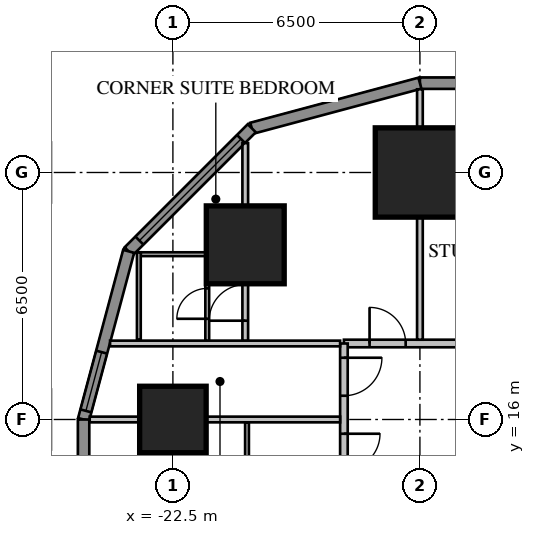
"""IFC4 building model, lengths in metres.
Left out: names, types, materials, properties, quantities, classifications, styles, units other than length and angle.
Written with IfcOpenShell. Run it as: python <this file> out.ifc"""

import sys

from ifc_helpers import new_model, si_unit, direction, frame, frame_2d, origin, origin_2d, place, context, subcontext, project, spatial, rectangle, extrude, element, fill, save


model = new_model("IFC4")
c1 = context("Model", 3, precision=1e-05, world=origin(), true_north=direction((0.0, 1.0)))
c2 = subcontext(c1, "Body", "Model", "MODEL_VIEW")
j1 = project(units=[si_unit("LENGTHUNIT", "METRE"), si_unit("PLANEANGLEUNIT", "RADIAN")], contexts=[c1])
p1 = place(None, origin())
s1 = spatial("IfcSite", under=j1, at=p1, CompositionType="ELEMENT")
p2 = place(p1, origin())
s2 = spatial("IfcBuilding", under=s1, at=p2, CompositionType="ELEMENT")
p3 = place(p2, frame((0.0, 0.0, 46.8)))
s3 = spatial("IfcBuildingStorey", under=s2, at=p3, CompositionType="ELEMENT", Elevation=46.8)
p4 = place(p3, frame((-16.0, 22.5, 0.0), z_axis=(0.0, 0.0, 1.0), x_axis=(1.0, 0.0, 0.0)))
e1 = element("IfcColumn", 1, at=p4, inside=s3, PredefinedType="COLUMN", context=c2, shape_type="SweptSolid", body=[
    extrude(rectangle(XDim=2.35, YDim=2.35, at=origin_2d()), origin(), (0.0, 0.0, 1.0), 3.85),
])
p5 = place(p3, frame((-20.596, 20.596, 0.0), z_axis=(0.0, 0.0, 1.0), x_axis=(1.0, 0.0, 0.0)))
e2 = element("IfcColumn", 2, at=p5, inside=s3, PredefinedType="COLUMN", context=c2, shape_type="SweptSolid", body=[
    extrude(rectangle(XDim=2.05, YDim=2.05, at=origin_2d()), origin(), (0.0, 0.0, 1.0), 3.85),
])
p6 = place(p3, frame((-22.5, 16.0, 0.0), z_axis=(0.0, 0.0, 1.0), x_axis=(1.0, 0.0, 0.0)))
e3 = element("IfcColumn", 3, at=p6, inside=s3, PredefinedType="COLUMN", context=c2, shape_type="SweptSolid", body=[
    extrude(rectangle(XDim=1.75, YDim=1.75, at=origin_2d()), origin(), (0.0, 0.0, 1.0), 3.85),
])
p7 = place(p3, frame((16.0, 24.85, 0.0), z_axis=(0.0, 0.0, 1.0), x_axis=(-1.0, 0.0, 0.0)))
e4 = element("IfcWall", 4, at=p7, inside=s3, PredefinedType="SOLIDWALL", context=c2, shape_type="SweptSolid", body=[
    extrude(rectangle(XDim=32.0, YDim=0.3, at=frame_2d((16.0, 0.0))), origin(), (0.0, 0.0, 1.0), 3.65),
])
p8 = place(p7, frame((1.2, 0.0, 0.75)))
e5 = element("IfcOpeningElement", 5, at=p8, cuts=e4, PredefinedType="OPENING", context=c2, shape_type="SweptSolid", body=[
    extrude(rectangle(XDim=1.6, YDim=1.8, at=frame_2d((0.8, 0.9))), frame((0.0, 0.17, 0.0), z_axis=(0.0, -1.0, 0.0), x_axis=(1.0, 0.0, 0.0)), (0.0, 0.0, 1.0), 0.34),
])
p9 = place(p7, frame((5.2, 0.0, 0.75)))
e6 = element("IfcOpeningElement", 6, at=p9, cuts=e4, PredefinedType="OPENING", context=c2, shape_type="SweptSolid", body=[
    extrude(rectangle(XDim=1.6, YDim=1.8, at=frame_2d((0.8, 0.9))), frame((0.0, 0.17, 0.0), z_axis=(0.0, -1.0, 0.0), x_axis=(1.0, 0.0, 0.0)), (0.0, 0.0, 1.0), 0.34),
])
p10 = place(p7, frame((17.2, 0.0, 0.75)))
e7 = element("IfcOpeningElement", 7, at=p10, cuts=e4, PredefinedType="OPENING", context=c2, shape_type="SweptSolid", body=[
    extrude(rectangle(XDim=1.6, YDim=1.8, at=frame_2d((0.8, 0.9))), frame((0.0, 0.17, 0.0), z_axis=(0.0, -1.0, 0.0), x_axis=(1.0, 0.0, 0.0)), (0.0, 0.0, 1.0), 0.34),
])
p11 = place(p7, frame((21.2, 0.0, 0.75)))
e8 = element("IfcOpeningElement", 8, at=p11, cuts=e4, PredefinedType="OPENING", context=c2, shape_type="SweptSolid", body=[
    extrude(rectangle(XDim=1.6, YDim=1.8, at=frame_2d((0.8, 0.9))), frame((0.0, 0.17, 0.0), z_axis=(0.0, -1.0, 0.0), x_axis=(1.0, 0.0, 0.0)), (0.0, 0.0, 1.0), 0.34),
])
p12 = place(p7, frame((25.2, 0.0, 0.75)))
e9 = element("IfcOpeningElement", 9, at=p12, cuts=e4, PredefinedType="OPENING", context=c2, shape_type="SweptSolid", body=[
    extrude(rectangle(XDim=1.6, YDim=1.8, at=frame_2d((0.8, 0.9))), frame((0.0, 0.17, 0.0), z_axis=(0.0, -1.0, 0.0), x_axis=(1.0, 0.0, 0.0)), (0.0, 0.0, 1.0), 0.34),
])
p13 = place(p7, frame((29.2, 0.0, 0.75)))
e10 = element("IfcOpeningElement", 10, at=p13, cuts=e4, PredefinedType="OPENING", context=c2, shape_type="SweptSolid", body=[
    extrude(rectangle(XDim=1.6, YDim=1.8, at=frame_2d((0.8, 0.9))), frame((0.0, 0.17, 0.0), z_axis=(0.0, -1.0, 0.0), x_axis=(1.0, 0.0, 0.0)), (0.0, 0.0, 1.0), 0.34),
])
p14 = place(p7, frame((8.8, 0.0, 0.75)))
e11 = element("IfcOpeningElement", 11, at=p14, cuts=e4, PredefinedType="OPENING", context=c2, shape_type="SweptSolid", body=[
    extrude(rectangle(XDim=2.4, YDim=1.8, at=frame_2d((1.2, 0.9))), frame((0.0, 0.17, 0.0), z_axis=(0.0, -1.0, 0.0), x_axis=(1.0, 0.0, 0.0)), (0.0, 0.0, 1.0), 0.34),
])
p15 = place(p7, frame((13.812, 0.0, 0.0)))
e12 = element("IfcOpeningElement", 12, at=p15, cuts=e4, PredefinedType="OPENING", context=c2, shape_type="SweptSolid", body=[
    extrude(rectangle(XDim=1.0, YDim=2.4, at=frame_2d((0.5, 1.2))), frame((0.0, 0.17, 0.0), z_axis=(0.0, -1.0, 0.0), x_axis=(1.0, 0.0, 0.0)), (0.0, 0.0, 1.0), 0.34),
])
p16 = place(p3, frame((-16.0, 24.85, 0.0), z_axis=(0.0, 0.0, 1.0), x_axis=(-0.965920218567, -0.258839972501, 0.0)))
e13 = element("IfcWall", 13, at=p16, inside=s3, PredefinedType="SOLIDWALL", context=c2, shape_type="SweptSolid", body=[
    extrude(rectangle(XDim=4.581, YDim=0.3, at=frame_2d((2.291, 0.0))), origin(), (0.0, 0.0, 1.0), 3.65),
])
p17 = place(p3, frame((-20.425, 23.664, 0.0), z_axis=(0.0, 0.0, 1.0), x_axis=(-0.707106781187, -0.707106781187, 0.0)))
e14 = element("IfcWall", 14, at=p17, inside=s3, PredefinedType="SOLIDWALL", context=c2, shape_type="SweptSolid", body=[
    extrude(rectangle(XDim=4.581, YDim=0.3, at=frame_2d((2.291, 0.0))), origin(), (0.0, 0.0, 1.0), 3.65),
])
p18 = place(p17, frame((0.4, 0.0, 0.75)))
e15 = element("IfcOpeningElement", 15, at=p18, cuts=e14, PredefinedType="OPENING", context=c2, shape_type="SweptSolid", body=[
    extrude(rectangle(XDim=3.781, YDim=1.8, at=frame_2d((1.891, 0.9))), frame((0.0, 0.17, 0.0), z_axis=(0.0, -1.0, 0.0), x_axis=(1.0, 0.0, 0.0)), (0.0, 0.0, 1.0), 0.34),
])
p19 = place(p3, frame((-23.664, 20.425, 0.0), z_axis=(0.0, 0.0, 1.0), x_axis=(-0.258839972501, -0.965920218567, 0.0)))
e16 = element("IfcWall", 16, at=p19, inside=s3, PredefinedType="SOLIDWALL", context=c2, shape_type="SweptSolid", body=[
    extrude(rectangle(XDim=4.581, YDim=0.3, at=frame_2d((2.291, 0.0))), origin(), (0.0, 0.0, 1.0), 3.65),
])
p20 = place(p19, frame((2.746, 0.0, 0.75)))
e17 = element("IfcOpeningElement", 17, at=p20, cuts=e16, PredefinedType="OPENING", context=c2, shape_type="SweptSolid", body=[
    extrude(rectangle(XDim=1.6, YDim=1.8, at=frame_2d((0.8, 0.9))), frame((0.0, 0.17, 0.0), z_axis=(0.0, -1.0, 0.0), x_axis=(1.0, 0.0, 0.0)), (0.0, 0.0, 1.0), 0.34),
])
p21 = place(p3, frame((-24.85, 16.0, 0.0), z_axis=(0.0, 0.0, 1.0), x_axis=(0.0, -1.0, 0.0)))
e18 = element("IfcWall", 18, at=p21, inside=s3, PredefinedType="SOLIDWALL", context=c2, shape_type="SweptSolid", body=[
    extrude(rectangle(XDim=32.0, YDim=0.3, at=frame_2d((16.0, 0.0))), origin(), (0.0, 0.0, 1.0), 3.65),
])
p22 = place(p21, frame((1.2, 0.0, 0.75)))
e19 = element("IfcOpeningElement", 19, at=p22, cuts=e18, PredefinedType="OPENING", context=c2, shape_type="SweptSolid", body=[
    extrude(rectangle(XDim=1.6, YDim=1.8, at=frame_2d((0.8, 0.9))), frame((0.0, 0.17, 0.0), z_axis=(0.0, -1.0, 0.0), x_axis=(1.0, 0.0, 0.0)), (0.0, 0.0, 1.0), 0.34),
])
p23 = place(p21, frame((5.2, 0.0, 0.75)))
e20 = element("IfcOpeningElement", 20, at=p23, cuts=e18, PredefinedType="OPENING", context=c2, shape_type="SweptSolid", body=[
    extrude(rectangle(XDim=1.6, YDim=1.8, at=frame_2d((0.8, 0.9))), frame((0.0, 0.17, 0.0), z_axis=(0.0, -1.0, 0.0), x_axis=(1.0, 0.0, 0.0)), (0.0, 0.0, 1.0), 0.34),
])
p24 = place(p21, frame((17.2, 0.0, 0.75)))
e21 = element("IfcOpeningElement", 21, at=p24, cuts=e18, PredefinedType="OPENING", context=c2, shape_type="SweptSolid", body=[
    extrude(rectangle(XDim=1.6, YDim=1.8, at=frame_2d((0.8, 0.9))), frame((0.0, 0.17, 0.0), z_axis=(0.0, -1.0, 0.0), x_axis=(1.0, 0.0, 0.0)), (0.0, 0.0, 1.0), 0.34),
])
p25 = place(p21, frame((21.2, 0.0, 0.75)))
e22 = element("IfcOpeningElement", 22, at=p25, cuts=e18, PredefinedType="OPENING", context=c2, shape_type="SweptSolid", body=[
    extrude(rectangle(XDim=1.6, YDim=1.8, at=frame_2d((0.8, 0.9))), frame((0.0, 0.17, 0.0), z_axis=(0.0, -1.0, 0.0), x_axis=(1.0, 0.0, 0.0)), (0.0, 0.0, 1.0), 0.34),
])
p26 = place(p21, frame((25.2, 0.0, 0.75)))
e23 = element("IfcOpeningElement", 23, at=p26, cuts=e18, PredefinedType="OPENING", context=c2, shape_type="SweptSolid", body=[
    extrude(rectangle(XDim=1.6, YDim=1.8, at=frame_2d((0.8, 0.9))), frame((0.0, 0.17, 0.0), z_axis=(0.0, -1.0, 0.0), x_axis=(1.0, 0.0, 0.0)), (0.0, 0.0, 1.0), 0.34),
])
p27 = place(p21, frame((29.2, 0.0, 0.75)))
e24 = element("IfcOpeningElement", 24, at=p27, cuts=e18, PredefinedType="OPENING", context=c2, shape_type="SweptSolid", body=[
    extrude(rectangle(XDim=1.6, YDim=1.8, at=frame_2d((0.8, 0.9))), frame((0.0, 0.17, 0.0), z_axis=(0.0, -1.0, 0.0), x_axis=(1.0, 0.0, 0.0)), (0.0, 0.0, 1.0), 0.34),
])
p28 = place(p21, frame((8.8, 0.0, 0.75)))
e25 = element("IfcOpeningElement", 25, at=p28, cuts=e18, PredefinedType="OPENING", context=c2, shape_type="SweptSolid", body=[
    extrude(rectangle(XDim=2.4, YDim=1.8, at=frame_2d((1.2, 0.9))), frame((0.0, 0.17, 0.0), z_axis=(0.0, -1.0, 0.0), x_axis=(1.0, 0.0, 0.0)), (0.0, 0.0, 1.0), 0.34),
])
p29 = place(p21, frame((13.812, 0.0, 0.0)))
e26 = element("IfcOpeningElement", 26, at=p29, cuts=e18, PredefinedType="OPENING", context=c2, shape_type="SweptSolid", body=[
    extrude(rectangle(XDim=1.0, YDim=2.4, at=frame_2d((0.5, 1.2))), frame((0.0, 0.17, 0.0), z_axis=(0.0, -1.0, 0.0), x_axis=(1.0, 0.0, 0.0)), (0.0, 0.0, 1.0), 0.34),
])
p30 = place(p3, frame((18.0, 18.0, 0.0), z_axis=(0.0, 0.0, 1.0), x_axis=(-1.0, 0.0, 0.0)))
e27 = element("IfcWall", 27, at=p30, inside=s3, PredefinedType="PARTITIONING", context=c2, shape_type="SweptSolid", body=[
    extrude(rectangle(XDim=36.0, YDim=0.2, at=frame_2d((18.0, 0.0))), origin(), (0.0, 0.0, 1.0), 3.65),
])
p31 = place(p30, frame((0.375, 0.0, 0.0)))
e28 = element("IfcOpeningElement", 28, at=p31, cuts=e27, PredefinedType="OPENING", context=c2, shape_type="SweptSolid", body=[
    extrude(rectangle(XDim=1.0, YDim=2.1, at=frame_2d((0.5, 1.05))), frame((0.0, 0.12, 0.0), z_axis=(0.0, -1.0, 0.0), x_axis=(1.0, 0.0, 0.0)), (0.0, 0.0, 1.0), 0.24),
])
p32 = place(p30, frame((3.95, 0.0, 0.0)))
e29 = element("IfcOpeningElement", 29, at=p32, cuts=e27, PredefinedType="OPENING", context=c2, shape_type="SweptSolid", body=[
    extrude(rectangle(XDim=0.95, YDim=2.1, at=frame_2d((0.475, 1.05))), frame((0.0, 0.12, 0.0), z_axis=(0.0, -1.0, 0.0), x_axis=(1.0, 0.0, 0.0)), (0.0, 0.0, 1.0), 0.24),
])
p33 = place(p30, frame((7.95, 0.0, 0.0)))
e30 = element("IfcOpeningElement", 30, at=p33, cuts=e27, PredefinedType="OPENING", context=c2, shape_type="SweptSolid", body=[
    extrude(rectangle(XDim=0.95, YDim=2.1, at=frame_2d((0.475, 1.05))), frame((0.0, 0.12, 0.0), z_axis=(0.0, -1.0, 0.0), x_axis=(1.0, 0.0, 0.0)), (0.0, 0.0, 1.0), 0.24),
])
p34 = place(p30, frame((19.95, 0.0, 0.0)))
e31 = element("IfcOpeningElement", 31, at=p34, cuts=e27, PredefinedType="OPENING", context=c2, shape_type="SweptSolid", body=[
    extrude(rectangle(XDim=0.95, YDim=2.1, at=frame_2d((0.475, 1.05))), frame((0.0, 0.12, 0.0), z_axis=(0.0, -1.0, 0.0), x_axis=(1.0, 0.0, 0.0)), (0.0, 0.0, 1.0), 0.24),
])
p35 = place(p30, frame((23.95, 0.0, 0.0)))
e32 = element("IfcOpeningElement", 32, at=p35, cuts=e27, PredefinedType="OPENING", context=c2, shape_type="SweptSolid", body=[
    extrude(rectangle(XDim=0.95, YDim=2.1, at=frame_2d((0.475, 1.05))), frame((0.0, 0.12, 0.0), z_axis=(0.0, -1.0, 0.0), x_axis=(1.0, 0.0, 0.0)), (0.0, 0.0, 1.0), 0.24),
])
p36 = place(p30, frame((27.95, 0.0, 0.0)))
e33 = element("IfcOpeningElement", 33, at=p36, cuts=e27, PredefinedType="OPENING", context=c2, shape_type="SweptSolid", body=[
    extrude(rectangle(XDim=0.95, YDim=2.1, at=frame_2d((0.475, 1.05))), frame((0.0, 0.12, 0.0), z_axis=(0.0, -1.0, 0.0), x_axis=(1.0, 0.0, 0.0)), (0.0, 0.0, 1.0), 0.24),
])
p37 = place(p30, frame((31.95, 0.0, 0.0)))
e34 = element("IfcOpeningElement", 34, at=p37, cuts=e27, PredefinedType="OPENING", context=c2, shape_type="SweptSolid", body=[
    extrude(rectangle(XDim=0.95, YDim=2.1, at=frame_2d((0.475, 1.05))), frame((0.0, 0.12, 0.0), z_axis=(0.0, -1.0, 0.0), x_axis=(1.0, 0.0, 0.0)), (0.0, 0.0, 1.0), 0.24),
])
p38 = place(p30, frame((34.375, 0.0, 0.0)))
e35 = element("IfcOpeningElement", 35, at=p38, cuts=e27, PredefinedType="OPENING", context=c2, shape_type="SweptSolid", body=[
    extrude(rectangle(XDim=0.95, YDim=2.1, at=frame_2d((0.475, 1.05))), frame((0.0, 0.12, 0.0), z_axis=(0.0, -1.0, 0.0), x_axis=(1.0, 0.0, 0.0)), (0.0, 0.0, 1.0), 0.24),
])
p39 = place(p30, frame((11.2, 0.0, 0.0)))
e36 = element("IfcOpeningElement", 36, at=p39, cuts=e27, PredefinedType="OPENING", context=c2, shape_type="SweptSolid", body=[
    extrude(rectangle(XDim=1.0, YDim=2.1, at=frame_2d((0.5, 1.05))), frame((0.0, 0.12, 0.0), z_axis=(0.0, -1.0, 0.0), x_axis=(1.0, 0.0, 0.0)), (0.0, 0.0, 1.0), 0.24),
])
p40 = place(p30, frame((15.2, 0.0, 0.0)))
e37 = element("IfcOpeningElement", 37, at=p40, cuts=e27, PredefinedType="OPENING", context=c2, shape_type="SweptSolid", body=[
    extrude(rectangle(XDim=1.0, YDim=2.1, at=frame_2d((0.5, 1.05))), frame((0.0, 0.12, 0.0), z_axis=(0.0, -1.0, 0.0), x_axis=(1.0, 0.0, 0.0)), (0.0, 0.0, 1.0), 0.24),
])
p41 = place(p3, frame((-16.0, 18.1, 0.0), z_axis=(0.0, 0.0, 1.0), x_axis=(0.0, 1.0, 0.0)))
e38 = element("IfcWall", 38, at=p41, inside=s3, PredefinedType="PARTITIONING", context=c2, shape_type="SweptSolid", body=[
    extrude(rectangle(XDim=6.589, YDim=0.15, at=frame_2d((3.295, 0.0))), origin(), (0.0, 0.0, 1.0), 3.65),
])
p42 = place(p3, frame((-21.596, 18.065, 0.0), z_axis=(0.0, 0.0, 1.0), x_axis=(0.0, 1.0, 0.0)))
e39 = element("IfcWall", 39, at=p42, inside=s3, PredefinedType="PARTITIONING", context=c2, shape_type="SweptSolid", body=[
    extrude(rectangle(XDim=2.335, YDim=0.1, at=frame_2d((1.167, 0.0))), origin(), (0.0, 0.0, 1.0), 3.65),
])
p43 = place(p42, frame((0.585, 0.0, 0.0)))
e40 = element("IfcOpeningElement", 40, at=p43, cuts=e39, PredefinedType="OPENING", context=c2, shape_type="SweptSolid", body=[
    extrude(rectangle(XDim=0.8, YDim=2.1, at=frame_2d((0.4, 1.05))), frame((0.0, 0.07, 0.0), z_axis=(0.0, -1.0, 0.0), x_axis=(1.0, 0.0, 0.0)), (0.0, 0.0, 1.0), 0.14),
])
p44 = place(p3, frame((-21.646, 20.35, 0.0), z_axis=(0.0, 0.0, 1.0), x_axis=(-1.0, 0.0, 0.0)))
e41 = element("IfcWall", 41, at=p44, inside=s3, PredefinedType="PARTITIONING", context=c2, shape_type="SweptSolid", body=[
    extrude(rectangle(XDim=1.7, YDim=0.1, at=frame_2d((0.85, 0.0))), origin(), (0.0, 0.0, 1.0), 3.65),
])
p45 = place(p3, frame((-23.396, 18.1, 0.0), z_axis=(0.0, 0.0, 1.0), x_axis=(0.0, 1.0, 0.0)))
e42 = element("IfcWall", 42, at=p45, inside=s3, PredefinedType="PARTITIONING", context=c2, shape_type="SweptSolid", body=[
    extrude(rectangle(XDim=2.3, YDim=0.1, at=frame_2d((1.15, 0.0))), origin(), (0.0, 0.0, 1.0), 3.65),
])
p46 = place(p3, frame((-20.596, 18.065, 0.0), z_axis=(0.0, 0.0, 1.0), x_axis=(0.0, 1.0, 0.0)))
e43 = element("IfcWall", 43, at=p46, inside=s3, PredefinedType="PARTITIONING", context=c2, shape_type="SweptSolid", body=[
    extrude(rectangle(XDim=5.209, YDim=0.15, at=frame_2d((2.604, 0.0))), origin(), (0.0, 0.0, 1.0), 3.65),
])
p47 = place(p46, frame((0.535, 0.0, 0.0)))
e44 = element("IfcOpeningElement", 44, at=p47, cuts=e43, PredefinedType="OPENING", context=c2, shape_type="SweptSolid", body=[
    extrude(rectangle(XDim=0.95, YDim=2.1, at=frame_2d((0.475, 1.05))), frame((0.0, 0.095, 0.0), z_axis=(0.0, -1.0, 0.0), x_axis=(1.0, 0.0, 0.0)), (0.0, 0.0, 1.0), 0.19),
])
p48 = place(p3, frame((-18.0, 18.0, 0.0), z_axis=(0.0, 0.0, 1.0), x_axis=(0.0, -1.0, 0.0)))
e45 = element("IfcWall", 45, at=p48, inside=s3, PredefinedType="PARTITIONING", context=c2, shape_type="SweptSolid", body=[
    extrude(rectangle(XDim=36.0, YDim=0.2, at=frame_2d((18.0, 0.0))), origin(), (0.0, 0.0, 1.0), 3.65),
])
p49 = place(p48, frame((0.375, 0.0, 0.0)))
e46 = element("IfcOpeningElement", 46, at=p49, cuts=e45, PredefinedType="OPENING", context=c2, shape_type="SweptSolid", body=[
    extrude(rectangle(XDim=1.0, YDim=2.1, at=frame_2d((0.5, 1.05))), frame((0.0, 0.12, 0.0), z_axis=(0.0, -1.0, 0.0), x_axis=(1.0, 0.0, 0.0)), (0.0, 0.0, 1.0), 0.24),
])
p50 = place(p48, frame((2.375, 0.0, 0.0)))
e47 = element("IfcOpeningElement", 47, at=p50, cuts=e45, PredefinedType="OPENING", context=c2, shape_type="SweptSolid", body=[
    extrude(rectangle(XDim=0.95, YDim=2.1, at=frame_2d((0.475, 1.05))), frame((0.0, 0.12, 0.0), z_axis=(0.0, -1.0, 0.0), x_axis=(1.0, 0.0, 0.0)), (0.0, 0.0, 1.0), 0.24),
])
p51 = place(p48, frame((7.95, 0.0, 0.0)))
e48 = element("IfcOpeningElement", 48, at=p51, cuts=e45, PredefinedType="OPENING", context=c2, shape_type="SweptSolid", body=[
    extrude(rectangle(XDim=0.95, YDim=2.1, at=frame_2d((0.475, 1.05))), frame((0.0, 0.12, 0.0), z_axis=(0.0, -1.0, 0.0), x_axis=(1.0, 0.0, 0.0)), (0.0, 0.0, 1.0), 0.24),
])
p52 = place(p48, frame((18.375, 0.0, 0.0)))
e49 = element("IfcOpeningElement", 49, at=p52, cuts=e45, PredefinedType="OPENING", context=c2, shape_type="SweptSolid", body=[
    extrude(rectangle(XDim=0.95, YDim=2.1, at=frame_2d((0.475, 1.05))), frame((0.0, 0.12, 0.0), z_axis=(0.0, -1.0, 0.0), x_axis=(1.0, 0.0, 0.0)), (0.0, 0.0, 1.0), 0.24),
])
p53 = place(p48, frame((23.95, 0.0, 0.0)))
e50 = element("IfcOpeningElement", 50, at=p53, cuts=e45, PredefinedType="OPENING", context=c2, shape_type="SweptSolid", body=[
    extrude(rectangle(XDim=0.95, YDim=2.1, at=frame_2d((0.475, 1.05))), frame((0.0, 0.12, 0.0), z_axis=(0.0, -1.0, 0.0), x_axis=(1.0, 0.0, 0.0)), (0.0, 0.0, 1.0), 0.24),
])
p54 = place(p48, frame((26.375, 0.0, 0.0)))
e51 = element("IfcOpeningElement", 51, at=p54, cuts=e45, PredefinedType="OPENING", context=c2, shape_type="SweptSolid", body=[
    extrude(rectangle(XDim=0.95, YDim=2.1, at=frame_2d((0.475, 1.05))), frame((0.0, 0.12, 0.0), z_axis=(0.0, -1.0, 0.0), x_axis=(1.0, 0.0, 0.0)), (0.0, 0.0, 1.0), 0.24),
])
p55 = place(p48, frame((31.95, 0.0, 0.0)))
e52 = element("IfcOpeningElement", 52, at=p55, cuts=e45, PredefinedType="OPENING", context=c2, shape_type="SweptSolid", body=[
    extrude(rectangle(XDim=0.95, YDim=2.1, at=frame_2d((0.475, 1.05))), frame((0.0, 0.12, 0.0), z_axis=(0.0, -1.0, 0.0), x_axis=(1.0, 0.0, 0.0)), (0.0, 0.0, 1.0), 0.24),
])
p56 = place(p48, frame((34.375, 0.0, 0.0)))
e53 = element("IfcOpeningElement", 53, at=p56, cuts=e45, PredefinedType="OPENING", context=c2, shape_type="SweptSolid", body=[
    extrude(rectangle(XDim=0.95, YDim=2.1, at=frame_2d((0.475, 1.05))), frame((0.0, 0.12, 0.0), z_axis=(0.0, -1.0, 0.0), x_axis=(1.0, 0.0, 0.0)), (0.0, 0.0, 1.0), 0.24),
])
p57 = place(p48, frame((11.2, 0.0, 0.0)))
e54 = element("IfcOpeningElement", 54, at=p57, cuts=e45, PredefinedType="OPENING", context=c2, shape_type="SweptSolid", body=[
    extrude(rectangle(XDim=1.0, YDim=2.1, at=frame_2d((0.5, 1.05))), frame((0.0, 0.12, 0.0), z_axis=(0.0, -1.0, 0.0), x_axis=(1.0, 0.0, 0.0)), (0.0, 0.0, 1.0), 0.24),
])
p58 = place(p3, frame((-18.1, 18.0, 0.0), z_axis=(0.0, 0.0, 1.0), x_axis=(-1.0, 0.0, 0.0)))
e55 = element("IfcWall", 55, at=p58, inside=s3, PredefinedType="PARTITIONING", context=c2, shape_type="SweptSolid", body=[
    extrude(rectangle(XDim=6.053, YDim=0.15, at=frame_2d((3.027, 0.0))), origin(), (0.0, 0.0, 1.0), 3.65),
])
p59 = place(p3, frame((-18.1, 16.0, 0.0), z_axis=(0.0, 0.0, 1.0), x_axis=(-1.0, 0.0, 0.0)))
e56 = element("IfcWall", 56, at=p59, inside=s3, PredefinedType="PARTITIONING", context=c2, shape_type="SweptSolid", body=[
    extrude(rectangle(XDim=6.589, YDim=0.15, at=frame_2d((3.295, 0.0))), origin(), (0.0, 0.0, 1.0), 3.65),
])
p60 = place(p3, frame((-20.55, 15.925, 0.0), z_axis=(0.0, 0.0, 1.0), x_axis=(0.0, -1.0, 0.0)))
e57 = element("IfcWall", 57, at=p60, inside=s3, PredefinedType="PARTITIONING", context=c2, shape_type="SweptSolid", body=[
    extrude(rectangle(XDim=2.15, YDim=0.1, at=frame_2d((1.075, 0.0))), origin(), (0.0, 0.0, 1.0), 3.65),
])
p61 = place(p60, frame((1.05, 0.0, 0.0)))
e58 = element("IfcOpeningElement", 58, at=p61, cuts=e57, PredefinedType="OPENING", context=c2, shape_type="SweptSolid", body=[
    extrude(rectangle(XDim=0.9, YDim=2.1, at=frame_2d((0.45, 1.05))), frame((0.0, 0.07, 0.0), z_axis=(0.0, -1.0, 0.0), x_axis=(1.0, 0.0, 0.0)), (0.0, 0.0, 1.0), 0.14),
])
p62 = place(p18, origin())
e59 = element("IfcWindow", 59, at=p62, inside=s3, PartitioningType="SINGLE_PANEL", PredefinedType="WINDOW", context=c2, shape_type="SweptSolid", body=[
    extrude(rectangle(XDim=3.781, YDim=1.8, at=frame_2d((1.891, 0.9))), frame((0.0, 0.03, 0.0), z_axis=(0.0, -1.0, 0.0), x_axis=(1.0, 0.0, 0.0)), (0.0, 0.0, 1.0), 0.06),
])
fill(e15, e59)
p63 = place(p20, origin())
e60 = element("IfcWindow", 60, at=p63, inside=s3, PartitioningType="SINGLE_PANEL", PredefinedType="WINDOW", context=c2, shape_type="SweptSolid", body=[
    extrude(rectangle(XDim=1.6, YDim=1.8, at=frame_2d((0.8, 0.9))), frame((0.0, 0.03, 0.0), z_axis=(0.0, -1.0, 0.0), x_axis=(1.0, 0.0, 0.0)), (0.0, 0.0, 1.0), 0.06),
])
fill(e17, e60)
p64 = place(p38, origin())
e61 = element("IfcDoor", 61, at=p64, inside=s3, OperationType="SINGLE_SWING_RIGHT", PredefinedType="DOOR", context=c2, shape_type="SweptSolid", body=[
    extrude(rectangle(XDim=0.95, YDim=2.1, at=frame_2d((0.475, 1.05))), frame((0.0, 0.025, 0.0), z_axis=(0.0, -1.0, 0.0), x_axis=(1.0, 0.0, 0.0)), (0.0, 0.0, 1.0), 0.05),
])
fill(e35, e61)
p65 = place(p43, origin())
e62 = element("IfcDoor", 62, at=p65, inside=s3, OperationType="SINGLE_SWING_LEFT", PredefinedType="DOOR", context=c2, shape_type="SweptSolid", body=[
    extrude(rectangle(XDim=0.8, YDim=2.1, at=frame_2d((0.4, 1.05))), frame((0.0, 0.025, 0.0), z_axis=(0.0, -1.0, 0.0), x_axis=(1.0, 0.0, 0.0)), (0.0, 0.0, 1.0), 0.05),
])
fill(e40, e62)
p66 = place(p47, origin())
e63 = element("IfcDoor", 63, at=p66, inside=s3, OperationType="SINGLE_SWING_LEFT", PredefinedType="DOOR", context=c2, shape_type="SweptSolid", body=[
    extrude(rectangle(XDim=0.95, YDim=2.1, at=frame_2d((0.475, 1.05))), frame((0.0, 0.025, 0.0), z_axis=(0.0, -1.0, 0.0), x_axis=(1.0, 0.0, 0.0)), (0.0, 0.0, 1.0), 0.05),
])
fill(e44, e63)
p67 = place(p49, origin())
e64 = element("IfcDoor", 64, at=p67, inside=s3, OperationType="SINGLE_SWING_LEFT", PredefinedType="DOOR", context=c2, shape_type="SweptSolid", body=[
    extrude(rectangle(XDim=1.0, YDim=2.1, at=frame_2d((0.5, 1.05))), frame((0.0, 0.025, 0.0), z_axis=(0.0, -1.0, 0.0), x_axis=(1.0, 0.0, 0.0)), (0.0, 0.0, 1.0), 0.05),
])
fill(e46, e64)
p68 = place(p50, origin())
e65 = element("IfcDoor", 65, at=p68, inside=s3, OperationType="SINGLE_SWING_LEFT", PredefinedType="DOOR", context=c2, shape_type="SweptSolid", body=[
    extrude(rectangle(XDim=0.95, YDim=2.1, at=frame_2d((0.475, 1.05))), frame((0.0, 0.025, 0.0), z_axis=(0.0, -1.0, 0.0), x_axis=(1.0, 0.0, 0.0)), (0.0, 0.0, 1.0), 0.05),
])
fill(e47, e65)
save(model, sys.argv[1])
